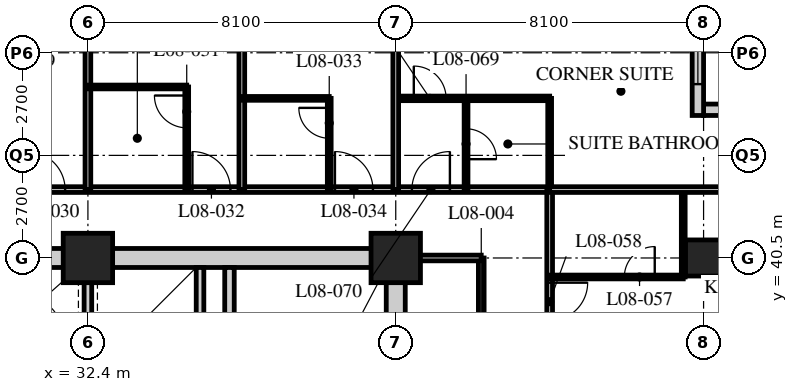
"""IFC4 building model, lengths in metres.
Left out: names, types, materials, properties, quantities, classifications, styles, units other than length and angle.
Written with IfcOpenShell. Run it as: python <this file> out.ifc"""

import sys

from ifc_helpers import new_model, si_unit, direction, frame, frame_2d, origin, origin_2d, place, context, subcontext, project, spatial, rectangle, hollow_rectangle, extrude, element, fill, save


model = new_model("IFC4")
c1 = context("Model", 3, precision=1e-05, world=origin(), true_north=direction((0.0, 1.0)))
c2 = subcontext(c1, "Body", "Model", "MODEL_VIEW")
j1 = project(units=[si_unit("LENGTHUNIT", "METRE"), si_unit("PLANEANGLEUNIT", "RADIAN")], contexts=[c1])
p1 = place(None, origin())
s1 = spatial("IfcSite", under=j1, at=p1, CompositionType="ELEMENT")
p2 = place(p1, origin())
s2 = spatial("IfcBuilding", under=s1, at=p2, CompositionType="ELEMENT")
p3 = place(p2, frame((0.0, 0.0, 39.8)))
s3 = spatial("IfcBuildingStorey", under=s2, at=p3, CompositionType="ELEMENT", Elevation=39.8)
for number, where, z_axis, x_axis in (
    (1, (32.4, 40.5, 0.0), (0.0, 0.0, 1.0), (1.0, 0.0, 0.0)),
    (2, (40.5, 40.5, 0.0), (0.0, 0.0, 1.0), (1.0, 0.0, 0.0)),
):
    element("IfcColumn", number, at=place(p3, frame(where, z_axis=z_axis, x_axis=x_axis)), inside=s3, PredefinedType="COLUMN", context=c2, shape_type="SweptSolid", body=[
        extrude(hollow_rectangle(XDim=1.3, YDim=1.3, WallThickness=0.13, at=origin_2d()), origin(), (0.0, 0.0, 1.0), 3.4),
    ])
p4 = place(p3, frame((48.6, 40.5, 0.0), z_axis=(0.0, 0.0, 1.0), x_axis=(1.0, 0.0, 0.0)))
e3 = element("IfcColumn", 3, at=p4, inside=s3, PredefinedType="COLUMN", context=c2, shape_type="SweptSolid", body=[
    extrude(hollow_rectangle(XDim=0.95, YDim=0.95, WallThickness=0.095, at=origin_2d()), origin(), (0.0, 0.0, 1.0), 3.4),
])
p5 = place(p3, frame((52.35, 44.4, 0.0), z_axis=(0.0, 0.0, 1.0), x_axis=(-1.0, 0.0, 0.0)))
e4 = element("IfcWall", 4, at=p5, inside=s3, PredefinedType="SOLIDWALL", context=c2, shape_type="SweptSolid", body=[
    extrude(rectangle(XDim=3.75, YDim=0.3, at=frame_2d((1.875, 0.0))), origin(), (0.0, 0.0, 1.0), 3.19),
])
p6 = place(p5, frame((0.225, 0.0, 0.9)))
e5 = element("IfcOpeningElement", 5, at=p6, cuts=e4, PredefinedType="OPENING", context=c2, shape_type="SweptSolid", body=[
    extrude(rectangle(XDim=3.0, YDim=1.5, at=frame_2d((1.5, 0.75))), frame((0.0, 0.16, 0.0), z_axis=(0.0, -1.0, 0.0), x_axis=(1.0, 0.0, 0.0)), (0.0, 0.0, 1.0), 0.32),
])
p7 = place(p3, frame((48.45, 44.25, 0.0), z_axis=(0.0, 0.0, 1.0), x_axis=(0.0, 1.0, 0.0)))
e6 = element("IfcWall", 6, at=p7, inside=s3, PredefinedType="SOLIDWALL", context=c2, shape_type="SweptSolid", body=[
    extrude(rectangle(XDim=4.35, YDim=0.3, at=frame_2d((2.175, 0.0))), origin(), (0.0, 0.0, 1.0), 3.19),
])
p8 = place(p7, frame((0.825, 0.0, 0.9)))
e7 = element("IfcOpeningElement", 7, at=p8, cuts=e6, PredefinedType="OPENING", context=c2, shape_type="SweptSolid", body=[
    extrude(rectangle(XDim=3.0, YDim=1.5, at=frame_2d((1.5, 0.75))), frame((0.0, 0.16, 0.0), z_axis=(0.0, -1.0, 0.0), x_axis=(1.0, 0.0, 0.0)), (0.0, 0.0, 1.0), 0.32),
])
p9 = place(p3, frame((12.15, 42.3, 0.0), z_axis=(0.0, 0.0, 1.0), x_axis=(1.0, 0.0, 0.0)))
e8 = element("IfcWall", 8, at=p9, inside=s3, PredefinedType="PARTITIONING", context=c2, shape_type="SweptSolid", body=[
    extrude(rectangle(XDim=32.4, YDim=0.15, at=frame_2d((16.2, 0.0))), origin(), (0.0, 0.0, 1.0), 3.19),
])
p10 = place(p9, frame((6.5, 0.0, 0.0)))
e9 = element("IfcOpeningElement", 9, at=p10, cuts=e8, PredefinedType="OPENING", context=c2, shape_type="SweptSolid", body=[
    extrude(rectangle(XDim=1.0, YDim=2.1, at=frame_2d((0.5, 1.05))), frame((0.0, 0.085, 0.0), z_axis=(0.0, -1.0, 0.0), x_axis=(1.0, 0.0, 0.0)), (0.0, 0.0, 1.0), 0.17),
])
p11 = place(p9, frame((8.4, 0.0, 0.0)))
e10 = element("IfcOpeningElement", 10, at=p11, cuts=e8, PredefinedType="OPENING", context=c2, shape_type="SweptSolid", body=[
    extrude(rectangle(XDim=1.0, YDim=2.1, at=frame_2d((0.5, 1.05))), frame((0.0, 0.085, 0.0), z_axis=(0.0, -1.0, 0.0), x_axis=(1.0, 0.0, 0.0)), (0.0, 0.0, 1.0), 0.17),
])
p12 = place(p9, frame((14.6, 0.0, 0.0)))
e11 = element("IfcOpeningElement", 11, at=p12, cuts=e8, PredefinedType="OPENING", context=c2, shape_type="SweptSolid", body=[
    extrude(rectangle(XDim=1.0, YDim=2.1, at=frame_2d((0.5, 1.05))), frame((0.0, 0.085, 0.0), z_axis=(0.0, -1.0, 0.0), x_axis=(1.0, 0.0, 0.0)), (0.0, 0.0, 1.0), 0.17),
])
p13 = place(p9, frame((18.65, 0.0, 0.0)))
e12 = element("IfcOpeningElement", 12, at=p13, cuts=e8, PredefinedType="OPENING", context=c2, shape_type="SweptSolid", body=[
    extrude(rectangle(XDim=1.0, YDim=2.1, at=frame_2d((0.5, 1.05))), frame((0.0, 0.085, 0.0), z_axis=(0.0, -1.0, 0.0), x_axis=(1.0, 0.0, 0.0)), (0.0, 0.0, 1.0), 0.17),
])
p14 = place(p9, frame((23.0, 0.0, 0.0)))
e13 = element("IfcOpeningElement", 13, at=p14, cuts=e8, PredefinedType="OPENING", context=c2, shape_type="SweptSolid", body=[
    extrude(rectangle(XDim=1.0, YDim=2.1, at=frame_2d((0.5, 1.05))), frame((0.0, 0.085, 0.0), z_axis=(0.0, -1.0, 0.0), x_axis=(1.0, 0.0, 0.0)), (0.0, 0.0, 1.0), 0.17),
])
p15 = place(p9, frame((26.75, 0.0, 0.0)))
e14 = element("IfcOpeningElement", 14, at=p15, cuts=e8, PredefinedType="OPENING", context=c2, shape_type="SweptSolid", body=[
    extrude(rectangle(XDim=1.0, YDim=2.1, at=frame_2d((0.5, 1.05))), frame((0.0, 0.085, 0.0), z_axis=(0.0, -1.0, 0.0), x_axis=(1.0, 0.0, 0.0)), (0.0, 0.0, 1.0), 0.17),
])
p16 = place(p9, frame((28.775, 0.0, 0.0)))
e15 = element("IfcOpeningElement", 15, at=p16, cuts=e8, PredefinedType="OPENING", context=c2, shape_type="SweptSolid", body=[
    extrude(rectangle(XDim=1.0, YDim=2.1, at=frame_2d((0.5, 1.05))), frame((0.0, 0.085, 0.0), z_axis=(0.0, -1.0, 0.0), x_axis=(1.0, 0.0, 0.0)), (0.0, 0.0, 1.0), 0.17),
])
p17 = place(p9, frame((2.625, 0.0, 0.0)))
e16 = element("IfcOpeningElement", 16, at=p17, cuts=e8, PredefinedType="OPENING", context=c2, shape_type="SweptSolid", body=[
    extrude(rectangle(XDim=1.0, YDim=2.1, at=frame_2d((0.5, 1.05))), frame((0.0, 0.085, 0.0), z_axis=(0.0, -1.0, 0.0), x_axis=(1.0, 0.0, 0.0)), (0.0, 0.0, 1.0), 0.17),
])
p18 = place(p3, frame((44.55, 16.2, 0.0), z_axis=(0.0, 0.0, 1.0), x_axis=(0.0, 1.0, 0.0)))
e17 = element("IfcWall", 17, at=p18, inside=s3, PredefinedType="PARTITIONING", context=c2, shape_type="SweptSolid", body=[
    extrude(rectangle(XDim=26.1, YDim=0.15, at=frame_2d((13.05, 0.0))), origin(), (0.0, 0.0, 1.0), 3.19),
])
p19 = place(p18, frame((2.75, 0.0, 0.0)))
e18 = element("IfcOpeningElement", 18, at=p19, cuts=e17, PredefinedType="OPENING", context=c2, shape_type="SweptSolid", body=[
    extrude(rectangle(XDim=1.0, YDim=2.1, at=frame_2d((0.5, 1.05))), frame((0.0, 0.085, 0.0), z_axis=(0.0, -1.0, 0.0), x_axis=(1.0, 0.0, 0.0)), (0.0, 0.0, 1.0), 0.17),
])
p20 = place(p18, frame((4.35, 0.0, 0.0)))
e19 = element("IfcOpeningElement", 19, at=p20, cuts=e17, PredefinedType="OPENING", context=c2, shape_type="SweptSolid", body=[
    extrude(rectangle(XDim=1.0, YDim=2.1, at=frame_2d((0.5, 1.05))), frame((0.0, 0.085, 0.0), z_axis=(0.0, -1.0, 0.0), x_axis=(1.0, 0.0, 0.0)), (0.0, 0.0, 1.0), 0.17),
])
p21 = place(p18, frame((8.4, 0.0, 0.0)))
e20 = element("IfcOpeningElement", 20, at=p21, cuts=e17, PredefinedType="OPENING", context=c2, shape_type="SweptSolid", body=[
    extrude(rectangle(XDim=1.0, YDim=2.1, at=frame_2d((0.5, 1.05))), frame((0.0, 0.085, 0.0), z_axis=(0.0, -1.0, 0.0), x_axis=(1.0, 0.0, 0.0)), (0.0, 0.0, 1.0), 0.17),
])
p22 = place(p18, frame((14.6, 0.0, 0.0)))
e21 = element("IfcOpeningElement", 21, at=p22, cuts=e17, PredefinedType="OPENING", context=c2, shape_type="SweptSolid", body=[
    extrude(rectangle(XDim=1.0, YDim=2.1, at=frame_2d((0.5, 1.05))), frame((0.0, 0.085, 0.0), z_axis=(0.0, -1.0, 0.0), x_axis=(1.0, 0.0, 0.0)), (0.0, 0.0, 1.0), 0.17),
])
p23 = place(p18, frame((18.65, 0.0, 0.0)))
e22 = element("IfcOpeningElement", 22, at=p23, cuts=e17, PredefinedType="OPENING", context=c2, shape_type="SweptSolid", body=[
    extrude(rectangle(XDim=1.0, YDim=2.1, at=frame_2d((0.5, 1.05))), frame((0.0, 0.085, 0.0), z_axis=(0.0, -1.0, 0.0), x_axis=(1.0, 0.0, 0.0)), (0.0, 0.0, 1.0), 0.17),
])
p24 = place(p18, frame((22.65, 0.0, 0.0)))
e23 = element("IfcOpeningElement", 23, at=p24, cuts=e17, PredefinedType="OPENING", context=c2, shape_type="SweptSolid", body=[
    extrude(rectangle(XDim=1.0, YDim=2.1, at=frame_2d((0.5, 1.05))), frame((0.0, 0.085, 0.0), z_axis=(0.0, -1.0, 0.0), x_axis=(1.0, 0.0, 0.0)), (0.0, 0.0, 1.0), 0.17),
])
p25 = place(p3, frame((42.75, 18.0, 0.0), z_axis=(0.0, 0.0, 1.0), x_axis=(0.0, 1.0, 0.0)))
e24 = element("IfcWall", 24, at=p25, inside=s3, PredefinedType="PARTITIONING", context=c2, shape_type="SweptSolid", body=[
    extrude(rectangle(XDim=22.5, YDim=0.15, at=frame_2d((11.25, 0.0))), origin(), (0.0, 0.0, 1.0), 3.19),
])
p26 = place(p25, frame((9.85, 0.0, 0.0)))
e25 = element("IfcOpeningElement", 25, at=p26, cuts=e24, PredefinedType="OPENING", context=c2, shape_type="SweptSolid", body=[
    extrude(rectangle(XDim=1.0, YDim=2.1, at=frame_2d((0.5, 1.05))), frame((0.0, 0.085, 0.0), z_axis=(0.0, -1.0, 0.0), x_axis=(1.0, 0.0, 0.0)), (0.0, 0.0, 1.0), 0.17),
])
p27 = place(p25, frame((17.95, 0.0, 0.0)))
e26 = element("IfcOpeningElement", 26, at=p27, cuts=e24, PredefinedType="OPENING", context=c2, shape_type="SweptSolid", body=[
    extrude(rectangle(XDim=1.0, YDim=2.1, at=frame_2d((0.5, 1.05))), frame((0.0, 0.085, 0.0), z_axis=(0.0, -1.0, 0.0), x_axis=(1.0, 0.0, 0.0)), (0.0, 0.0, 1.0), 0.17),
])
p28 = place(p3, frame((42.75, 40.5, 0.0), z_axis=(0.0, 0.0, 1.0), x_axis=(-1.0, 0.0, 0.0)))
e27 = element("IfcWall", 27, at=p28, inside=s3, PredefinedType="PARTITIONING", context=c2, shape_type="SweptSolid", body=[
    extrude(rectangle(XDim=2.05, YDim=0.15, at=frame_2d((1.025, 0.0))), origin(), (0.0, 0.0, 1.0), 2.578),
])
p29 = place(p3, frame((32.4, 42.3, 0.0), z_axis=(0.0, 0.0, 1.0), x_axis=(0.0, 1.0, 0.0)))
e28 = element("IfcWall", 28, at=p29, inside=s3, PredefinedType="PARTITIONING", context=c2, shape_type="SweptSolid", body=[
    extrude(rectangle(XDim=6.0, YDim=0.15, at=frame_2d((3.0, 0.0))), origin(), (0.0, 0.0, 1.0), 2.578),
])
p30 = place(p3, frame((32.4, 45.0, 0.0), z_axis=(0.0, 0.0, 1.0), x_axis=(1.0, 0.0, 0.0)))
e29 = element("IfcWall", 29, at=p30, inside=s3, PredefinedType="PARTITIONING", context=c2, shape_type="SweptSolid", body=[
    extrude(rectangle(XDim=2.6, YDim=0.1, at=frame_2d((1.3, 0.0))), origin(), (0.0, 0.0, 1.0), 3.19),
])
p31 = place(p3, frame((35.0, 42.3, 0.0), z_axis=(0.0, 0.0, 1.0), x_axis=(0.0, 1.0, 0.0)))
e30 = element("IfcWall", 30, at=p31, inside=s3, PredefinedType="PARTITIONING", context=c2, shape_type="SweptSolid", body=[
    extrude(rectangle(XDim=2.7, YDim=0.1, at=frame_2d((1.35, 0.0))), origin(), (0.0, 0.0, 1.0), 3.19),
])
p32 = place(p31, frame((1.625, 0.0, 0.0)))
e31 = element("IfcOpeningElement", 31, at=p32, cuts=e30, PredefinedType="OPENING", context=c2, shape_type="SweptSolid", body=[
    extrude(rectangle(XDim=0.85, YDim=2.1, at=frame_2d((0.425, 1.05))), frame((0.0, 0.06, 0.0), z_axis=(0.0, -1.0, 0.0), x_axis=(1.0, 0.0, 0.0)), (0.0, 0.0, 1.0), 0.12),
])
p33 = place(p3, frame((36.45, 42.3, 0.0), z_axis=(0.0, 0.0, 1.0), x_axis=(0.0, 1.0, 0.0)))
e32 = element("IfcWall", 32, at=p33, inside=s3, PredefinedType="PARTITIONING", context=c2, shape_type="SweptSolid", body=[
    extrude(rectangle(XDim=6.0, YDim=0.15, at=frame_2d((3.0, 0.0))), origin(), (0.0, 0.0, 1.0), 3.19),
])
p34 = place(p3, frame((36.45, 44.7, 0.0), z_axis=(0.0, 0.0, 1.0), x_axis=(1.0, 0.0, 0.0)))
e33 = element("IfcWall", 33, at=p34, inside=s3, PredefinedType="PARTITIONING", context=c2, shape_type="SweptSolid", body=[
    extrude(rectangle(XDim=2.3, YDim=0.1, at=frame_2d((1.15, 0.0))), origin(), (0.0, 0.0, 1.0), 3.19),
])
p35 = place(p3, frame((38.75, 42.3, 0.0), z_axis=(0.0, 0.0, 1.0), x_axis=(0.0, 1.0, 0.0)))
e34 = element("IfcWall", 34, at=p35, inside=s3, PredefinedType="PARTITIONING", context=c2, shape_type="SweptSolid", body=[
    extrude(rectangle(XDim=2.4, YDim=0.1, at=frame_2d((1.2, 0.0))), origin(), (0.0, 0.0, 1.0), 3.19),
])
p36 = place(p35, frame((1.35, 0.0, 0.0)))
e35 = element("IfcOpeningElement", 35, at=p36, cuts=e34, PredefinedType="OPENING", context=c2, shape_type="SweptSolid", body=[
    extrude(rectangle(XDim=0.8, YDim=2.1, at=frame_2d((0.4, 1.05))), frame((0.0, 0.06, 0.0), z_axis=(0.0, -1.0, 0.0), x_axis=(1.0, 0.0, 0.0)), (0.0, 0.0, 1.0), 0.12),
])
p37 = place(p3, frame((48.065, 40.0, 0.0), z_axis=(0.0, 0.0, 1.0), x_axis=(0.0, 1.0, 0.0)))
e36 = element("IfcWall", 36, at=p37, inside=s3, PredefinedType="PARTITIONING", context=c2, shape_type="SweptSolid", body=[
    extrude(rectangle(XDim=2.3, YDim=0.1, at=frame_2d((1.15, 0.0))), origin(), (0.0, 0.0, 1.0), 3.19),
])
p38 = place(p3, frame((44.55, 40.0, 0.0), z_axis=(0.0, 0.0, 1.0), x_axis=(1.0, 0.0, 0.0)))
e37 = element("IfcWall", 37, at=p38, inside=s3, PredefinedType="PARTITIONING", context=c2, shape_type="SweptSolid", body=[
    extrude(rectangle(XDim=3.515, YDim=0.1, at=frame_2d((1.757, 0.0))), origin(), (0.0, 0.0, 1.0), 3.19),
])
p39 = place(p38, frame((1.965, 0.0, 0.0)))
e38 = element("IfcOpeningElement", 38, at=p39, cuts=e37, PredefinedType="OPENING", context=c2, shape_type="SweptSolid", body=[
    extrude(rectangle(XDim=0.8, YDim=2.1, at=frame_2d((0.4, 1.05))), frame((0.0, 0.06, 0.0), z_axis=(0.0, -1.0, 0.0), x_axis=(1.0, 0.0, 0.0)), (0.0, 0.0, 1.0), 0.12),
])
p40 = place(p3, frame((40.5, 44.7, 0.0), z_axis=(0.0, 0.0, 1.0), x_axis=(1.0, 0.0, 0.0)))
e39 = element("IfcWall", 39, at=p40, inside=s3, PredefinedType="PARTITIONING", context=c2, shape_type="SweptSolid", body=[
    extrude(rectangle(XDim=4.05, YDim=0.12, at=frame_2d((2.025, 0.0))), origin(), (0.0, 0.0, 1.0), 3.19),
])
p41 = place(p40, frame((0.475, 0.0, 0.0)))
e40 = element("IfcOpeningElement", 40, at=p41, cuts=e39, PredefinedType="OPENING", context=c2, shape_type="SweptSolid", body=[
    extrude(rectangle(XDim=0.85, YDim=2.1, at=frame_2d((0.425, 1.05))), frame((0.0, 0.07, 0.0), z_axis=(0.0, -1.0, 0.0), x_axis=(1.0, 0.0, 0.0)), (0.0, 0.0, 1.0), 0.14),
])
p42 = place(p3, frame((42.35, 42.3, 0.0), z_axis=(0.0, 0.0, 1.0), x_axis=(0.0, 1.0, 0.0)))
e41 = element("IfcWall", 41, at=p42, inside=s3, PredefinedType="PARTITIONING", context=c2, shape_type="SweptSolid", body=[
    extrude(rectangle(XDim=2.4, YDim=0.1, at=frame_2d((1.2, 0.0))), origin(), (0.0, 0.0, 1.0), 3.19),
])
p43 = place(p42, frame((0.8, 0.0, 0.0)))
e42 = element("IfcOpeningElement", 42, at=p43, cuts=e41, PredefinedType="OPENING", context=c2, shape_type="SweptSolid", body=[
    extrude(rectangle(XDim=0.8, YDim=2.1, at=frame_2d((0.4, 1.05))), frame((0.0, 0.06, 0.0), z_axis=(0.0, -1.0, 0.0), x_axis=(1.0, 0.0, 0.0)), (0.0, 0.0, 1.0), 0.12),
])
p44 = place(p3, frame((44.55, 42.3, 0.0), z_axis=(0.0, 0.0, 1.0), x_axis=(0.0, 1.0, 0.0)))
e43 = element("IfcWall", 43, at=p44, inside=s3, PredefinedType="PARTITIONING", context=c2, shape_type="SweptSolid", body=[
    extrude(rectangle(XDim=2.4, YDim=0.1, at=frame_2d((1.2, 0.0))), origin(), (0.0, 0.0, 1.0), 3.19),
])
p45 = place(p3, frame((44.55, 42.3, 0.0), z_axis=(0.0, 0.0, 1.0), x_axis=(1.0, 0.0, 0.0)))
e44 = element("IfcWall", 44, at=p45, inside=s3, PredefinedType="PARTITIONING", context=c2, shape_type="SweptSolid", body=[
    extrude(rectangle(XDim=7.8, YDim=0.15, at=frame_2d((3.9, 0.0))), origin(), (0.0, 0.0, 1.0), 3.19),
])
p46 = place(p3, frame((40.5, 42.3, 0.0), z_axis=(0.0, 0.0, 1.0), x_axis=(0.0, 1.0, 0.0)))
e45 = element("IfcWall", 45, at=p46, inside=s3, PredefinedType="PARTITIONING", context=c2, shape_type="SweptSolid", body=[
    extrude(rectangle(XDim=6.0, YDim=0.15, at=frame_2d((3.0, 0.0))), origin(), (0.0, 0.0, 1.0), 2.578),
])
p47 = place(p3, frame((15.95, 40.5, 0.0), z_axis=(0.0, 0.0, 1.0), x_axis=(1.0, 0.0, 0.0)))
e46 = element("IfcWall", 46, at=p47, inside=s3, PredefinedType="SOLIDWALL", context=c2, shape_type="SweptSolid", body=[
    extrude(rectangle(XDim=24.8, YDim=0.5, at=frame_2d((12.4, 0.0))), origin(), (0.0, 0.0, 1.0), 2.54),
])
p48 = place(p47, frame((11.5, 0.0, 0.0)))
e47 = element("IfcOpeningElement", 47, at=p48, cuts=e46, PredefinedType="OPENING", context=c2, shape_type="SweptSolid", body=[
    extrude(rectangle(XDim=1.8, YDim=2.4, at=frame_2d((0.9, 1.2))), frame((0.0, 0.26, 0.0), z_axis=(0.0, -1.0, 0.0), x_axis=(1.0, 0.0, 0.0)), (0.0, 0.0, 1.0), 0.52),
])
p49 = place(p3, frame((40.5, 24.55, 0.0), z_axis=(0.0, 0.0, 1.0), x_axis=(0.0, 1.0, 0.0)))
e48 = element("IfcWall", 48, at=p49, inside=s3, PredefinedType="SOLIDWALL", context=c2, shape_type="SweptSolid", body=[
    extrude(rectangle(XDim=15.7, YDim=0.5, at=frame_2d((7.85, 0.0))), origin(), (0.0, 0.0, 1.0), 2.578),
])
p50 = place(p3, frame((32.4, 32.5, 0.0), z_axis=(0.0, 0.0, 1.0), x_axis=(0.0, 1.0, 0.0)))
e49 = element("IfcWall", 49, at=p50, inside=s3, PredefinedType="SOLIDWALL", context=c2, shape_type="SweptSolid", body=[
    extrude(rectangle(XDim=7.75, YDim=0.2, at=frame_2d((3.875, 0.0))), origin(), (0.0, 0.0, 1.0), 2.578),
])
p51 = place(p50, frame((1.9, 0.0, 0.0)))
e50 = element("IfcOpeningElement", 50, at=p51, cuts=e49, PredefinedType="OPENING", context=c2, shape_type="SweptSolid", body=[
    extrude(rectangle(XDim=1.2, YDim=2.1, at=frame_2d((0.6, 1.05))), frame((0.0, 0.11, 0.0), z_axis=(0.0, -1.0, 0.0), x_axis=(1.0, 0.0, 0.0)), (0.0, 0.0, 1.0), 0.22),
])
p52 = place(p3, frame((36.125, 32.5, 0.0), z_axis=(0.0, 0.0, 1.0), x_axis=(0.0, 1.0, 0.0)))
e51 = element("IfcWall", 51, at=p52, inside=s3, PredefinedType="SOLIDWALL", context=c2, shape_type="SweptSolid", body=[
    extrude(rectangle(XDim=7.75, YDim=0.25, at=frame_2d((3.875, 0.0))), origin(), (0.0, 0.0, 1.0), 3.19),
])
p53 = place(p52, frame((0.45, 0.0, 0.0)))
e52 = element("IfcOpeningElement", 52, at=p53, cuts=e51, PredefinedType="OPENING", context=c2, shape_type="SweptSolid", body=[
    extrude(rectangle(XDim=1.2, YDim=2.1, at=frame_2d((0.6, 1.05))), frame((0.0, 0.135, 0.0), z_axis=(0.0, -1.0, 0.0), x_axis=(1.0, 0.0, 0.0)), (0.0, 0.0, 1.0), 0.27),
])
p54 = place(p3, frame((35.35, 37.65, 0.0), z_axis=(0.0, 0.0, 1.0), x_axis=(0.0, 1.0, 0.0)))
e53 = element("IfcWall", 53, at=p54, inside=s3, PredefinedType="SOLIDWALL", context=c2, shape_type="SweptSolid", body=[
    extrude(rectangle(XDim=2.6, YDim=0.2, at=frame_2d((1.3, 0.0))), origin(), (0.0, 0.0, 1.0), 3.19),
])
p55 = place(p8, origin())
e54 = element("IfcWindow", 54, at=p55, inside=s3, PartitioningType="SINGLE_PANEL", PredefinedType="WINDOW", context=c2, shape_type="SweptSolid", body=[
    extrude(rectangle(XDim=3.0, YDim=1.5, at=frame_2d((1.5, 0.75))), frame((0.0, 0.03, 0.0), z_axis=(0.0, -1.0, 0.0), x_axis=(1.0, 0.0, 0.0)), (0.0, 0.0, 1.0), 0.06),
])
fill(e7, e54)
p56 = place(p13, origin())
e55 = element("IfcDoor", 55, at=p56, inside=s3, OperationType="SINGLE_SWING_LEFT", PredefinedType="DOOR", context=c2, shape_type="SweptSolid", body=[
    extrude(rectangle(XDim=1.0, YDim=2.1, at=frame_2d((0.5, 1.05))), frame((0.0, 0.025, 0.0), z_axis=(0.0, -1.0, 0.0), x_axis=(1.0, 0.0, 0.0)), (0.0, 0.0, 1.0), 0.05),
])
fill(e12, e55)
p57 = place(p32, origin())
e56 = element("IfcDoor", 56, at=p57, inside=s3, OperationType="SINGLE_SWING_RIGHT", PredefinedType="DOOR", context=c2, shape_type="SweptSolid", body=[
    extrude(rectangle(XDim=0.85, YDim=2.1, at=frame_2d((0.425, 1.05))), frame((0.0, 0.025, 0.0), z_axis=(0.0, -1.0, 0.0), x_axis=(1.0, 0.0, 0.0)), (0.0, 0.0, 1.0), 0.05),
])
fill(e31, e56)
p58 = place(p14, origin())
e57 = element("IfcDoor", 57, at=p58, inside=s3, OperationType="SINGLE_SWING_LEFT", PredefinedType="DOOR", context=c2, shape_type="SweptSolid", body=[
    extrude(rectangle(XDim=1.0, YDim=2.1, at=frame_2d((0.5, 1.05))), frame((0.0, 0.025, 0.0), z_axis=(0.0, -1.0, 0.0), x_axis=(1.0, 0.0, 0.0)), (0.0, 0.0, 1.0), 0.05),
])
fill(e13, e57)
p59 = place(p36, origin())
e58 = element("IfcDoor", 58, at=p59, inside=s3, OperationType="SINGLE_SWING_RIGHT", PredefinedType="DOOR", context=c2, shape_type="SweptSolid", body=[
    extrude(rectangle(XDim=0.8, YDim=2.1, at=frame_2d((0.4, 1.05))), frame((0.0, 0.025, 0.0), z_axis=(0.0, -1.0, 0.0), x_axis=(1.0, 0.0, 0.0)), (0.0, 0.0, 1.0), 0.05),
])
fill(e35, e58)
p60 = place(p15, origin())
e59 = element("IfcDoor", 59, at=p60, inside=s3, OperationType="SINGLE_SWING_LEFT", PredefinedType="DOOR", context=c2, shape_type="SweptSolid", body=[
    extrude(rectangle(XDim=1.0, YDim=2.1, at=frame_2d((0.5, 1.05))), frame((0.0, 0.025, 0.0), z_axis=(0.0, -1.0, 0.0), x_axis=(1.0, 0.0, 0.0)), (0.0, 0.0, 1.0), 0.05),
])
fill(e14, e59)
p61 = place(p39, origin())
e60 = element("IfcDoor", 60, at=p61, inside=s3, OperationType="SINGLE_SWING_RIGHT", PredefinedType="DOOR", context=c2, shape_type="SweptSolid", body=[
    extrude(rectangle(XDim=0.8, YDim=2.1, at=frame_2d((0.4, 1.05))), frame((0.0, 0.025, 0.0), z_axis=(0.0, -1.0, 0.0), x_axis=(1.0, 0.0, 0.0)), (0.0, 0.0, 1.0), 0.05),
])
fill(e38, e60)
p62 = place(p24, origin())
e61 = element("IfcDoor", 61, at=p62, inside=s3, OperationType="SINGLE_SWING_LEFT", PredefinedType="DOOR", context=c2, shape_type="SweptSolid", body=[
    extrude(rectangle(XDim=1.0, YDim=2.1, at=frame_2d((0.5, 1.05))), frame((0.0, 0.025, 0.0), z_axis=(0.0, -1.0, 0.0), x_axis=(1.0, 0.0, 0.0)), (0.0, 0.0, 1.0), 0.05),
])
fill(e23, e61)
p63 = place(p43, origin())
e62 = element("IfcDoor", 62, at=p63, inside=s3, OperationType="SINGLE_SWING_RIGHT", PredefinedType="DOOR", context=c2, shape_type="SweptSolid", body=[
    extrude(rectangle(XDim=0.8, YDim=2.1, at=frame_2d((0.4, 1.05))), frame((0.0, 0.025, 0.0), z_axis=(0.0, -1.0, 0.0), x_axis=(1.0, 0.0, 0.0)), (0.0, 0.0, 1.0), 0.05),
])
fill(e42, e62)
p64 = place(p16, origin())
e63 = element("IfcDoor", 63, at=p64, inside=s3, OperationType="SINGLE_SWING_RIGHT", PredefinedType="DOOR", context=c2, shape_type="SweptSolid", body=[
    extrude(rectangle(XDim=1.0, YDim=2.1, at=frame_2d((0.5, 1.05))), frame((0.0, 0.025, 0.0), z_axis=(0.0, -1.0, 0.0), x_axis=(1.0, 0.0, 0.0)), (0.0, 0.0, 1.0), 0.05),
])
fill(e15, e63)
p65 = place(p41, origin())
e64 = element("IfcDoor", 64, at=p65, inside=s3, OperationType="SINGLE_SWING_LEFT", PredefinedType="DOOR", context=c2, shape_type="SweptSolid", body=[
    extrude(rectangle(XDim=0.85, YDim=2.1, at=frame_2d((0.425, 1.05))), frame((0.0, 0.025, 0.0), z_axis=(0.0, -1.0, 0.0), x_axis=(1.0, 0.0, 0.0)), (0.0, 0.0, 1.0), 0.05),
])
fill(e40, e64)
save(model, sys.argv[1])
